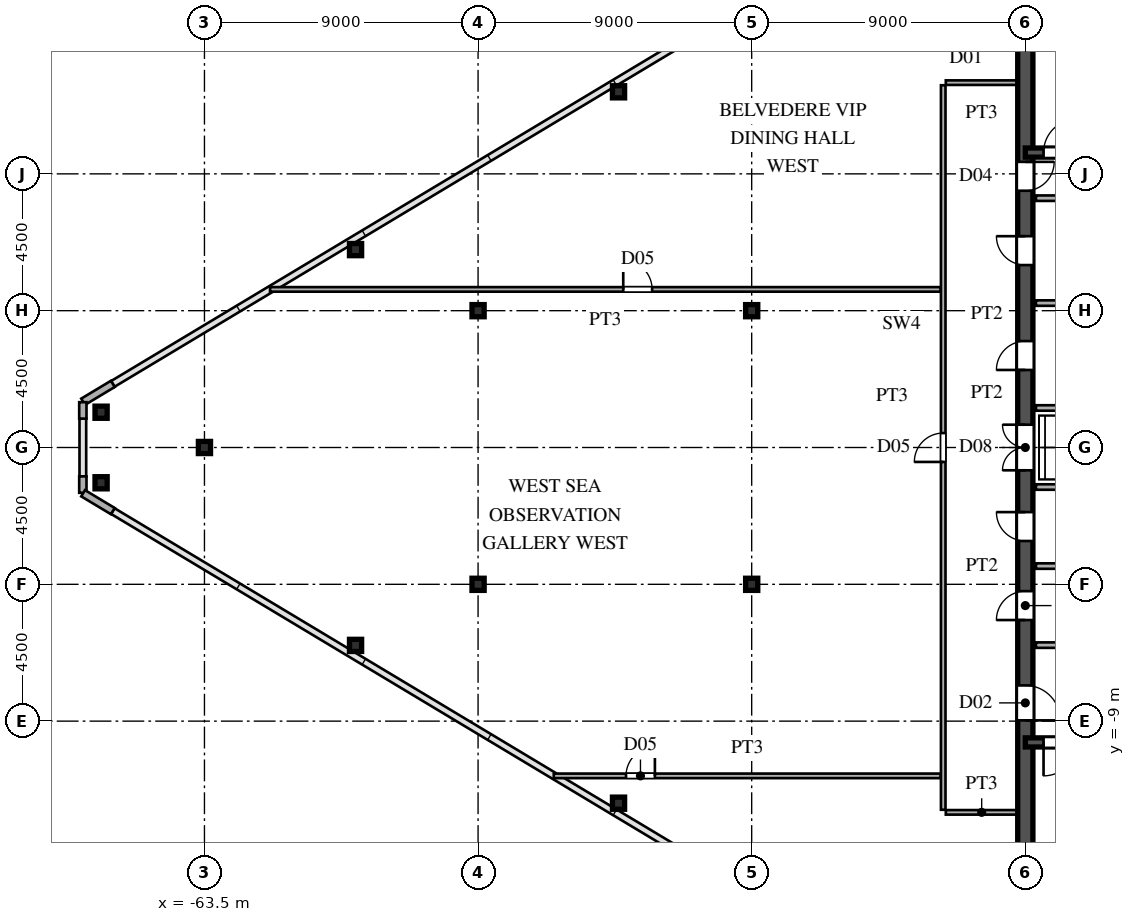
"""IFC4 building model, lengths in metres.
Left out: names, types, materials, properties, quantities, classifications, styles, units other than length and angle.
Written with IfcOpenShell. Run it as: python <this file> out.ifc"""

import sys

from ifc_helpers import new_model, si_unit, direction, frame, frame_2d, origin, origin_2d, place, context, subcontext, project, spatial, rectangle, hollow_rectangle, i_section, extrude, source, transform, mapped, element, fill, save


model = new_model("IFC4")
c1 = context("Model", 3, precision=1e-05, world=origin(), true_north=direction((0.0, 1.0)))
c2 = subcontext(c1, "Body", "Model", "MODEL_VIEW")
j1 = project(units=[si_unit("LENGTHUNIT", "METRE"), si_unit("PLANEANGLEUNIT", "RADIAN")], contexts=[c1])
p1 = place(None, origin())
s1 = spatial("IfcSite", under=j1, at=p1, CompositionType="ELEMENT")
p2 = place(p1, origin())
s2 = spatial("IfcBuilding", under=s1, at=p2, CompositionType="ELEMENT")
p3 = place(p2, frame((0.0, 0.0, 274.2)))
s3 = spatial("IfcBuildingStorey", under=s2, at=p3, CompositionType="ELEMENT", Elevation=274.2)
m1 = source(origin(), c2, "Body", "SweptSolid", [
    extrude(i_section(OverallWidth=0.4, OverallDepth=0.4, WebThickness=0.013, FlangeThickness=0.021, at=origin_2d()), origin(), (0.0, 0.0, 1.0), 4.8),
])
for number, where, z_axis, x_axis in (
    (1, (-45.5, -4.5, 0.0), (0.0, 0.0, 1.0), (1.0, 0.0, 0.0)),
    (2, (-45.5, 4.5, 0.0), (0.0, 0.0, 1.0), (1.0, 0.0, 0.0)),
    (3, (-54.5, -4.5, 0.0), (0.0, 0.0, 1.0), (1.0, 0.0, 0.0)),
    (4, (-54.5, 4.5, 0.0), (0.0, 0.0, 1.0), (1.0, 0.0, 0.0)),
    (5, (-63.5, 0.0, 0.0), (0.0, 0.0, 1.0), (1.0, 0.0, 0.0)),
):
    element("IfcColumn", number, at=place(p3, frame(where, z_axis=z_axis, x_axis=x_axis)), inside=s3, PredefinedType="COLUMN", context=c2, shape_type="MappedRepresentation", body=[
        mapped(m1, transform((0.0, 0.0, 0.0), scale=1.0)),
    ])
m2 = source(origin(), c2, "Body", "SweptSolid", [
    extrude(hollow_rectangle(XDim=0.4, YDim=0.4, WallThickness=0.016, at=origin_2d()), origin(), (0.0, 0.0, 1.0), 4.8),
])
for number, where, z_axis, x_axis in (
    (6, (-66.9, 1.16, 0.0), (0.0, 0.0, 1.0), (1.0, 0.0, 0.0)),
    (7, (-66.9, -1.16, 0.0), (0.0, 0.0, 1.0), (1.0, 0.0, 0.0)),
    (8, (-49.88, -11.699, 0.0), (0.0, 0.0, 1.0), (1.0, 0.0, 0.0)),
    (9, (-58.53, -6.509, 0.0), (0.0, 0.0, 1.0), (1.0, 0.0, 0.0)),
    (10, (-49.88, 11.699, 0.0), (0.0, 0.0, 1.0), (1.0, 0.0, 0.0)),
    (11, (-58.53, 6.509, 0.0), (0.0, 0.0, 1.0), (1.0, 0.0, 0.0)),
):
    element("IfcColumn", number, at=place(p3, frame(where, z_axis=z_axis, x_axis=x_axis)), inside=s3, PredefinedType="COLUMN", context=c2, shape_type="MappedRepresentation", body=[
        mapped(m2, transform((0.0, 0.0, 0.0), scale=1.0)),
    ])
p4 = place(p3, frame((-66.514, 2.092, 0.0), z_axis=(0.0, 0.0, 1.0), x_axis=(-0.85743623509, -0.514590228002, 0.0)))
e12 = element("IfcWall", 12, at=p4, inside=s3, PredefinedType="SOLIDWALL", context=c2, shape_type="SweptSolid", body=[
    extrude(rectangle(XDim=1.14, YDim=0.24, at=frame_2d((0.57, 0.0))), origin(), (0.0, 0.0, 1.0), 4.52),
])
for number, where, z_axis, x_axis in (
    (13, (-67.5, 1.49, 0.0), (0.0, 0.0, 1.0), (0.0, -1.0, 0.0)),
    (14, (-67.5, -0.95, 0.0), (0.0, 0.0, 1.0), (0.0, -1.0, 0.0)),
):
    element("IfcWall", number, at=place(p3, frame(where, z_axis=z_axis, x_axis=x_axis)), inside=s3, PredefinedType="SOLIDWALL", context=c2, shape_type="SweptSolid", body=[
        extrude(rectangle(XDim=0.54, YDim=0.24, at=frame_2d((0.27, 0.0))), origin(), (0.0, 0.0, 1.0), 4.52),
    ])
p5 = place(p3, frame((-67.491, -1.505, 0.0), z_axis=(0.0, 0.0, 1.0), x_axis=(0.85743623509, -0.514590228002, 0.0)))
e15 = element("IfcWall", 15, at=p5, inside=s3, PredefinedType="SOLIDWALL", context=c2, shape_type="SweptSolid", body=[
    extrude(rectangle(XDim=1.14, YDim=0.24, at=frame_2d((0.57, 0.0))), origin(), (0.0, 0.0, 1.0), 4.52),
])
p6 = place(p3, frame((-36.5, -13.65, 0.0), z_axis=(0.0, 0.0, 1.0), x_axis=(0.0, 1.0, 0.0)))
e16 = element("IfcWall", 16, at=p6, inside=s3, PredefinedType="SHEAR", context=c2, shape_type="SweptSolid", body=[
    extrude(rectangle(XDim=7.15, YDim=0.5, at=frame_2d((3.575, 0.0))), origin(), (0.0, 0.0, 1.0), 4.52),
])
p7 = place(p6, frame((4.675, 0.0, 0.0)))
e17 = element("IfcOpeningElement", 17, at=p7, cuts=e16, PredefinedType="OPENING", context=c2, shape_type="SweptSolid", body=[
    extrude(rectangle(XDim=1.15, YDim=2.2, at=frame_2d((0.575, 1.1))), frame((0.0, 0.26, 0.0), z_axis=(0.0, -1.0, 0.0), x_axis=(1.0, 0.0, 0.0)), (0.0, 0.0, 1.0), 0.52),
])
p8 = place(p3, frame((-36.5, -1.3, 0.0), z_axis=(0.0, 0.0, 1.0), x_axis=(0.0, 1.0, 0.0)))
e18 = element("IfcWall", 18, at=p8, inside=s3, PredefinedType="SHEAR", context=c2, shape_type="SweptSolid", body=[
    extrude(rectangle(XDim=2.6, YDim=0.5, at=frame_2d((1.3, 0.0))), origin(), (0.0, 0.0, 1.0), 4.52),
])
p9 = place(p8, frame((0.55, 0.0, 0.0)))
e19 = element("IfcOpeningElement", 19, at=p9, cuts=e18, PredefinedType="OPENING", context=c2, shape_type="SweptSolid", body=[
    extrude(rectangle(XDim=1.5, YDim=2.3, at=frame_2d((0.75, 1.15))), frame((0.0, 0.26, 0.0), z_axis=(0.0, -1.0, 0.0), x_axis=(1.0, 0.0, 0.0)), (0.0, 0.0, 1.0), 0.52),
])
p10 = place(p3, frame((-36.5, 8.2, 0.0), z_axis=(0.0, 0.0, 1.0), x_axis=(0.0, 1.0, 0.0)))
e20 = element("IfcWall", 20, at=p10, inside=s3, PredefinedType="SHEAR", context=c2, shape_type="SweptSolid", body=[
    extrude(rectangle(XDim=5.45, YDim=0.5, at=frame_2d((2.725, 0.0))), origin(), (0.0, 0.0, 1.0), 4.52),
])
p11 = place(p10, frame((0.245, 0.0, 0.0)))
e21 = element("IfcOpeningElement", 21, at=p11, cuts=e20, PredefinedType="OPENING", context=c2, shape_type="SweptSolid", body=[
    extrude(rectangle(XDim=0.95, YDim=2.15, at=frame_2d((0.475, 1.075))), frame((0.0, 0.26, 0.0), z_axis=(0.0, -1.0, 0.0), x_axis=(1.0, 0.0, 0.0)), (0.0, 0.0, 1.0), 0.52),
])
p12 = place(p3, frame((-36.5, -6.5, 0.0), z_axis=(0.0, 0.0, 1.0), x_axis=(0.0, 1.0, 0.0)))
e22 = element("IfcWall", 22, at=p12, inside=s3, PredefinedType="SHEAR", context=c2, shape_type="SweptSolid", body=[
    extrude(rectangle(XDim=2.6, YDim=0.5, at=frame_2d((1.3, 0.0))), origin(), (0.0, 0.0, 1.0), 4.52),
])
p13 = place(p12, frame((0.825, 0.0, 0.0)))
e23 = element("IfcOpeningElement", 23, at=p13, cuts=e22, PredefinedType="OPENING", context=c2, shape_type="SweptSolid", body=[
    extrude(rectangle(XDim=0.95, YDim=2.15, at=frame_2d((0.475, 1.075))), frame((0.0, 0.26, 0.0), z_axis=(0.0, -1.0, 0.0), x_axis=(1.0, 0.0, 0.0)), (0.0, 0.0, 1.0), 0.52),
])
p14 = place(p3, frame((-36.5, -3.9, 0.0), z_axis=(0.0, 0.0, 1.0), x_axis=(0.0, 1.0, 0.0)))
e24 = element("IfcWall", 24, at=p14, inside=s3, PredefinedType="SHEAR", context=c2, shape_type="SweptSolid", body=[
    extrude(rectangle(XDim=2.6, YDim=0.5, at=frame_2d((1.3, 0.0))), origin(), (0.0, 0.0, 1.0), 4.52),
])
p15 = place(p14, frame((0.825, 0.0, 0.0)))
e25 = element("IfcOpeningElement", 25, at=p15, cuts=e24, PredefinedType="OPENING", context=c2, shape_type="SweptSolid", body=[
    extrude(rectangle(XDim=0.95, YDim=2.15, at=frame_2d((0.475, 1.075))), frame((0.0, 0.26, 0.0), z_axis=(0.0, -1.0, 0.0), x_axis=(1.0, 0.0, 0.0)), (0.0, 0.0, 1.0), 0.52),
])
p16 = place(p3, frame((-36.5, 1.3, 0.0), z_axis=(0.0, 0.0, 1.0), x_axis=(0.0, 1.0, 0.0)))
e26 = element("IfcWall", 26, at=p16, inside=s3, PredefinedType="SHEAR", context=c2, shape_type="SweptSolid", body=[
    extrude(rectangle(XDim=3.45, YDim=0.5, at=frame_2d((1.725, 0.0))), origin(), (0.0, 0.0, 1.0), 4.52),
])
p17 = place(p16, frame((1.25, 0.0, 0.0)))
e27 = element("IfcOpeningElement", 27, at=p17, cuts=e26, PredefinedType="OPENING", context=c2, shape_type="SweptSolid", body=[
    extrude(rectangle(XDim=0.95, YDim=2.15, at=frame_2d((0.475, 1.075))), frame((0.0, 0.26, 0.0), z_axis=(0.0, -1.0, 0.0), x_axis=(1.0, 0.0, 0.0)), (0.0, 0.0, 1.0), 0.52),
])
p18 = place(p3, frame((-36.5, 4.75, 0.0), z_axis=(0.0, 0.0, 1.0), x_axis=(0.0, 1.0, 0.0)))
e28 = element("IfcWall", 28, at=p18, inside=s3, PredefinedType="SHEAR", context=c2, shape_type="SweptSolid", body=[
    extrude(rectangle(XDim=3.45, YDim=0.5, at=frame_2d((1.725, 0.0))), origin(), (0.0, 0.0, 1.0), 4.52),
])
p19 = place(p18, frame((1.25, 0.0, 0.0)))
e29 = element("IfcOpeningElement", 29, at=p19, cuts=e28, PredefinedType="OPENING", context=c2, shape_type="SweptSolid", body=[
    extrude(rectangle(XDim=0.95, YDim=2.15, at=frame_2d((0.475, 1.075))), frame((0.0, 0.26, 0.0), z_axis=(0.0, -1.0, 0.0), x_axis=(1.0, 0.0, 0.0)), (0.0, 0.0, 1.0), 0.52),
])
p20 = place(p3, frame((-36.5, -9.7, 0.0), z_axis=(0.0, 0.0, 1.0), x_axis=(1.0, 0.0, 0.0)))
e30 = element("IfcWall", 30, at=p20, inside=s3, PredefinedType="SHEAR", context=c2, shape_type="SweptSolid", body=[
    extrude(rectangle(XDim=9.0, YDim=0.3, at=frame_2d((4.5, 0.0))), origin(), (0.0, 0.0, 1.0), 4.52),
])
p21 = place(p20, frame((0.6, 0.0, 0.0)))
e31 = element("IfcOpeningElement", 31, at=p21, cuts=e30, PredefinedType="OPENING", context=c2, shape_type="SweptSolid", body=[
    extrude(rectangle(XDim=1.1, YDim=2.2, at=frame_2d((0.55, 1.1))), frame((0.0, 0.16, 0.0), z_axis=(0.0, -1.0, 0.0), x_axis=(1.0, 0.0, 0.0)), (0.0, 0.0, 1.0), 0.32),
])
p22 = place(p3, frame((-36.5, 9.7, 0.0), z_axis=(0.0, 0.0, 1.0), x_axis=(1.0, 0.0, 0.0)))
e32 = element("IfcWall", 32, at=p22, inside=s3, PredefinedType="SHEAR", context=c2, shape_type="SweptSolid", body=[
    extrude(rectangle(XDim=9.0, YDim=0.3, at=frame_2d((4.5, 0.0))), origin(), (0.0, 0.0, 1.0), 4.52),
])
p23 = place(p22, frame((0.6, 0.0, 0.0)))
e33 = element("IfcOpeningElement", 33, at=p23, cuts=e32, PredefinedType="OPENING", context=c2, shape_type="SweptSolid", body=[
    extrude(rectangle(XDim=1.1, YDim=2.2, at=frame_2d((0.55, 1.1))), frame((0.0, 0.16, 0.0), z_axis=(0.0, -1.0, 0.0), x_axis=(1.0, 0.0, 0.0)), (0.0, 0.0, 1.0), 0.32),
])
for number, where, z_axis, x_axis in (
    (34, (-36.15, -6.5, 0.0), (0.0, 0.0, 1.0), (1.0, 0.0, 0.0)),
    (35, (-36.15, 8.2, 0.0), (0.0, 0.0, 1.0), (1.0, 0.0, 0.0)),
):
    element("IfcWall", number, at=place(p3, frame(where, z_axis=z_axis, x_axis=x_axis)), inside=s3, PredefinedType="PARTITIONING", context=c2, shape_type="SweptSolid", body=[
        extrude(rectangle(XDim=5.7, YDim=0.18, at=frame_2d((2.85, 0.0))), origin(), (0.0, 0.0, 1.0), 4.52),
    ])
for number, where, z_axis, x_axis in (
    (36, (-36.15, -1.3, 0.0), (0.0, 0.0, 1.0), (1.0, 0.0, 0.0)),
    (37, (-36.15, 1.3, 0.0), (0.0, 0.0, 1.0), (1.0, 0.0, 0.0)),
    (38, (-36.15, -3.9, 0.0), (0.0, 0.0, 1.0), (1.0, 0.0, 0.0)),
    (39, (-36.15, 4.75, 0.0), (0.0, 0.0, 1.0), (1.0, 0.0, 0.0)),
):
    element("IfcWall", number, at=place(p3, frame(where, z_axis=z_axis, x_axis=x_axis)), inside=s3, PredefinedType="PARTITIONING", context=c2, shape_type="SweptSolid", body=[
        extrude(rectangle(XDim=2.95, YDim=0.18, at=frame_2d((1.475, 0.0))), origin(), (0.0, 0.0, 1.0), 4.52),
    ])
p24 = place(p3, frame((-39.115, -12.0, 0.0), z_axis=(0.0, 0.0, 1.0), x_axis=(1.0, 0.0, 0.0)))
e40 = element("IfcWall", 40, at=p24, inside=s3, PredefinedType="PARTITIONING", context=c2, shape_type="SweptSolid", body=[
    extrude(rectangle(XDim=2.36, YDim=0.15, at=frame_2d((1.18, 0.0))), origin(), (0.0, 0.0, 1.0), 4.52),
])
p25 = place(p3, frame((-52.01, -10.8, 0.0), z_axis=(0.0, 0.0, 1.0), x_axis=(1.0, 0.0, 0.0)))
e41 = element("IfcWall", 41, at=p25, inside=s3, PredefinedType="PARTITIONING", context=c2, shape_type="SweptSolid", body=[
    extrude(rectangle(XDim=12.725, YDim=0.15, at=frame_2d((6.363, 0.0))), origin(), (0.0, 0.0, 1.0), 4.52),
])
p26 = place(p25, frame((2.376, 0.0, 0.0)))
e42 = element("IfcOpeningElement", 42, at=p26, cuts=e41, PredefinedType="OPENING", context=c2, shape_type="SweptSolid", body=[
    extrude(rectangle(XDim=0.95, YDim=2.15, at=frame_2d((0.475, 1.075))), frame((0.0, 0.085, 0.0), z_axis=(0.0, -1.0, 0.0), x_axis=(1.0, 0.0, 0.0)), (0.0, 0.0, 1.0), 0.17),
])
p27 = place(p3, frame((-61.343, 5.2, 0.0), z_axis=(0.0, 0.0, 1.0), x_axis=(1.0, 0.0, 0.0)))
e43 = element("IfcWall", 43, at=p27, inside=s3, PredefinedType="PARTITIONING", context=c2, shape_type="SweptSolid", body=[
    extrude(rectangle(XDim=22.058, YDim=0.15, at=frame_2d((11.029, 0.0))), origin(), (0.0, 0.0, 1.0), 4.52),
])
p28 = place(p27, frame((11.618, 0.0, 0.0)))
e44 = element("IfcOpeningElement", 44, at=p28, cuts=e43, PredefinedType="OPENING", context=c2, shape_type="SweptSolid", body=[
    extrude(rectangle(XDim=0.95, YDim=2.15, at=frame_2d((0.475, 1.075))), frame((0.0, 0.085, 0.0), z_axis=(0.0, -1.0, 0.0), x_axis=(1.0, 0.0, 0.0)), (0.0, 0.0, 1.0), 0.17),
])
p29 = place(p3, frame((-39.115, 12.0, 0.0), z_axis=(0.0, 0.0, 1.0), x_axis=(1.0, 0.0, 0.0)))
e45 = element("IfcWall", 45, at=p29, inside=s3, PredefinedType="PARTITIONING", context=c2, shape_type="SweptSolid", body=[
    extrude(rectangle(XDim=2.36, YDim=0.15, at=frame_2d((1.18, 0.0))), origin(), (0.0, 0.0, 1.0), 4.52),
])
p30 = place(p3, frame((-39.2, -11.915, 0.0), z_axis=(0.0, 0.0, 1.0), x_axis=(0.0, 1.0, 0.0)))
e46 = element("IfcWall", 46, at=p30, inside=s3, PredefinedType="PARTITIONING", context=c2, shape_type="SweptSolid", body=[
    extrude(rectangle(XDim=23.83, YDim=0.15, at=frame_2d((11.915, 0.0))), origin(), (0.0, 0.0, 1.0), 4.52),
])
p31 = place(p30, frame((11.44, 0.0, 0.0)))
e47 = element("IfcOpeningElement", 47, at=p31, cuts=e46, PredefinedType="OPENING", context=c2, shape_type="SweptSolid", body=[
    extrude(rectangle(XDim=0.95, YDim=2.15, at=frame_2d((0.475, 1.075))), frame((0.0, 0.085, 0.0), z_axis=(0.0, -1.0, 0.0), x_axis=(1.0, 0.0, 0.0)), (0.0, 0.0, 1.0), 0.17),
])
m3 = source(origin(), c2, "Body", "SweptSolid", [
    extrude(rectangle(XDim=1.15, YDim=2.2, at=frame_2d((0.575, 1.1))), frame((0.0, 0.025, 0.0), z_axis=(0.0, -1.0, 0.0), x_axis=(1.0, 0.0, 0.0)), (0.0, 0.0, 1.0), 0.05),
])
p32 = place(p7, frame((1.15, 0.0, 0.0), z_axis=(0.0, 0.0, 1.0), x_axis=(-1.0, 0.0, 0.0)))
e48 = element("IfcDoor", 48, at=p32, inside=s3, OperationType="SINGLE_SWING_LEFT", PredefinedType="DOOR", context=c2, shape_type="MappedRepresentation", body=[
    mapped(m3, transform((0.0, 0.0, 0.0), scale=1.0)),
])
fill(e17, e48)
m4 = source(origin(), c2, "Body", "SweptSolid", [
    extrude(rectangle(XDim=1.5, YDim=2.3, at=frame_2d((0.75, 1.15))), frame((0.0, 0.025, 0.0), z_axis=(0.0, -1.0, 0.0), x_axis=(1.0, 0.0, 0.0)), (0.0, 0.0, 1.0), 0.05),
])
p33 = place(p9, origin())
e49 = element("IfcDoor", 49, at=p33, inside=s3, OperationType="DOUBLE_SWING_LEFT", PredefinedType="DOOR", context=c2, shape_type="MappedRepresentation", body=[
    mapped(m4, transform((0.0, 0.0, 0.0), scale=1.0)),
])
fill(e19, e49)
m5 = source(origin(), c2, "Body", "SweptSolid", [
    extrude(rectangle(XDim=0.95, YDim=2.15, at=frame_2d((0.475, 1.075))), frame((0.0, 0.025, 0.0), z_axis=(0.0, -1.0, 0.0), x_axis=(1.0, 0.0, 0.0)), (0.0, 0.0, 1.0), 0.05),
])
p34 = place(p11, frame((0.95, 0.0, 0.0), z_axis=(0.0, 0.0, 1.0), x_axis=(-1.0, 0.0, 0.0)))
e50 = element("IfcDoor", 50, at=p34, inside=s3, OperationType="SINGLE_SWING_RIGHT", PredefinedType="DOOR", context=c2, shape_type="MappedRepresentation", body=[
    mapped(m5, transform((0.0, 0.0, 0.0), scale=1.0)),
])
fill(e21, e50)
p35 = place(p13, origin())
e51 = element("IfcDoor", 51, at=p35, inside=s3, OperationType="SINGLE_SWING_LEFT", PredefinedType="DOOR", context=c2, shape_type="MappedRepresentation", body=[
    mapped(m5, transform((0.0, 0.0, 0.0), scale=1.0)),
])
fill(e23, e51)
p36 = place(p15, origin())
e52 = element("IfcDoor", 52, at=p36, inside=s3, OperationType="SINGLE_SWING_RIGHT", PredefinedType="DOOR", context=c2, shape_type="MappedRepresentation", body=[
    mapped(m5, transform((0.0, 0.0, 0.0), scale=1.0)),
])
fill(e25, e52)
p37 = place(p17, origin())
e53 = element("IfcDoor", 53, at=p37, inside=s3, OperationType="SINGLE_SWING_LEFT", PredefinedType="DOOR", context=c2, shape_type="MappedRepresentation", body=[
    mapped(m5, transform((0.0, 0.0, 0.0), scale=1.0)),
])
fill(e27, e53)
p38 = place(p19, origin())
e54 = element("IfcDoor", 54, at=p38, inside=s3, OperationType="SINGLE_SWING_RIGHT", PredefinedType="DOOR", context=c2, shape_type="MappedRepresentation", body=[
    mapped(m5, transform((0.0, 0.0, 0.0), scale=1.0)),
])
fill(e29, e54)
m6 = source(origin(), c2, "Body", "SweptSolid", [
    extrude(rectangle(XDim=1.1, YDim=2.2, at=frame_2d((0.55, 1.1))), frame((0.0, 0.025, 0.0), z_axis=(0.0, -1.0, 0.0), x_axis=(1.0, 0.0, 0.0)), (0.0, 0.0, 1.0), 0.05),
])
p39 = place(p21, frame((1.1, 0.0, 0.0), z_axis=(0.0, 0.0, 1.0), x_axis=(-1.0, 0.0, 0.0)))
e55 = element("IfcDoor", 55, at=p39, inside=s3, OperationType="SINGLE_SWING_LEFT", PredefinedType="DOOR", context=c2, shape_type="MappedRepresentation", body=[
    mapped(m6, transform((0.0, 0.0, 0.0), scale=1.0)),
])
fill(e31, e55)
p40 = place(p23, origin())
e56 = element("IfcDoor", 56, at=p40, inside=s3, OperationType="SINGLE_SWING_RIGHT", PredefinedType="DOOR", context=c2, shape_type="MappedRepresentation", body=[
    mapped(m6, transform((0.0, 0.0, 0.0), scale=1.0)),
])
fill(e33, e56)
m7 = source(origin(), c2, "Body", "SweptSolid", [
    extrude(rectangle(XDim=0.95, YDim=2.15, at=frame_2d((0.475, 1.075))), frame((0.0, 0.025, 0.0), z_axis=(0.0, -1.0, 0.0), x_axis=(1.0, 0.0, 0.0)), (0.0, 0.0, 1.0), 0.05),
])
p41 = place(p26, origin())
e57 = element("IfcDoor", 57, at=p41, inside=s3, OperationType="SINGLE_SWING_RIGHT", PredefinedType="DOOR", context=c2, shape_type="MappedRepresentation", body=[
    mapped(m7, transform((0.0, 0.0, 0.0), scale=1.0)),
])
fill(e42, e57)
p42 = place(p28, origin())
e58 = element("IfcDoor", 58, at=p42, inside=s3, OperationType="SINGLE_SWING_LEFT", PredefinedType="DOOR", context=c2, shape_type="MappedRepresentation", body=[
    mapped(m7, transform((0.0, 0.0, 0.0), scale=1.0)),
])
fill(e44, e58)
p43 = place(p31, origin())
e59 = element("IfcDoor", 59, at=p43, inside=s3, OperationType="SINGLE_SWING_LEFT", PredefinedType="DOOR", context=c2, shape_type="MappedRepresentation", body=[
    mapped(m7, transform((0.0, 0.0, 0.0), scale=1.0)),
])
fill(e47, e59)
save(model, sys.argv[1])
